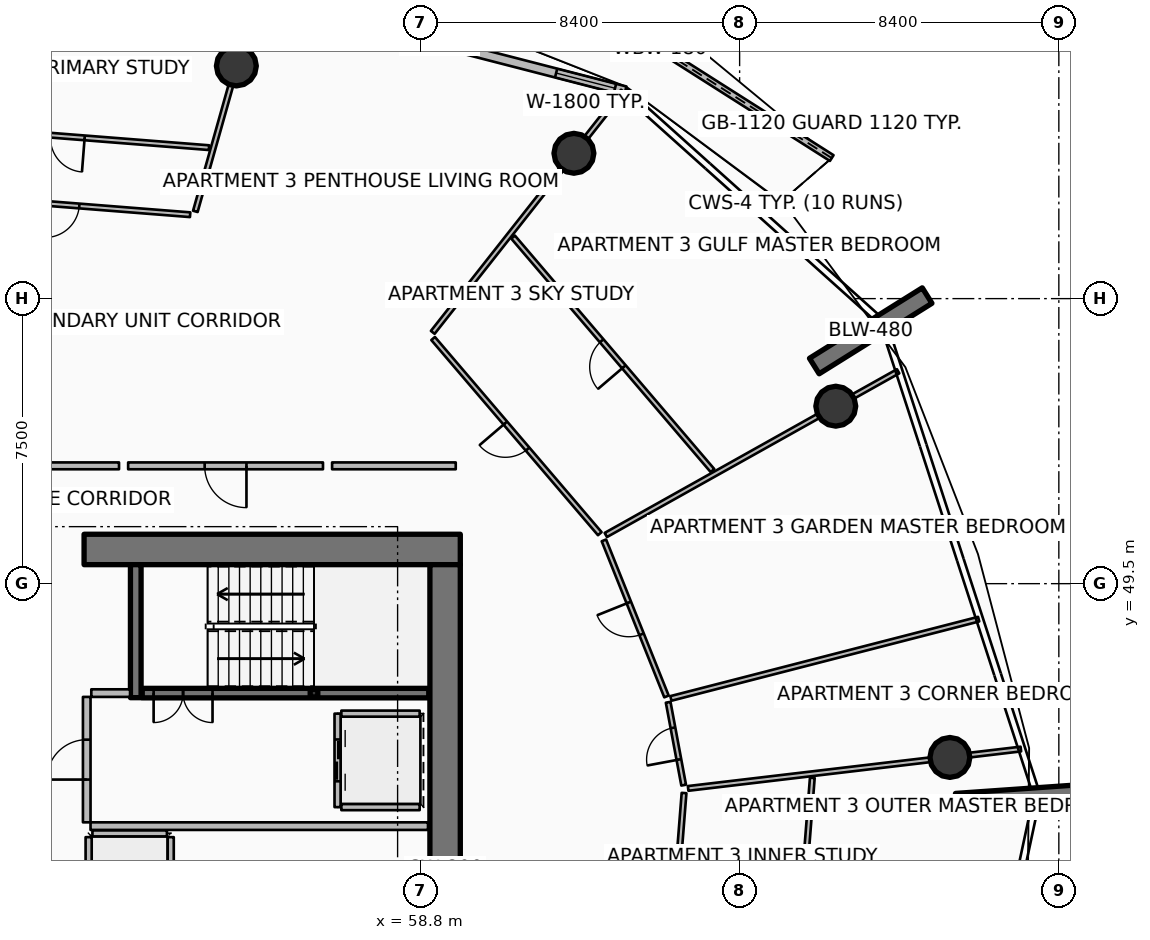
"""IFC4 building model, lengths in metres.
Left out: names, types, materials, properties, quantities, classifications, styles, units other than length and angle.
Written with IfcOpenShell. Run it as: python <this file> out.ifc"""

import sys

from ifc_helpers import new_model, si_unit, direction, frame, frame_2d, origin, origin_2d, place, context, subcontext, project, spatial, polyline, rectangle, hollow_rectangle, circle, outline, extrude, element, fill, save


model = new_model("IFC4")
c1 = context("Model", 3, precision=1e-05, world=origin(), true_north=direction((0.0, 1.0)))
c2 = subcontext(c1, "Body", "Model", "MODEL_VIEW")
j1 = project(units=[si_unit("LENGTHUNIT", "METRE"), si_unit("PLANEANGLEUNIT", "RADIAN")], contexts=[c1])
p1 = place(None, origin())
s1 = spatial("IfcSite", under=j1, at=p1, CompositionType="ELEMENT")
p2 = place(p1, origin())
s2 = spatial("IfcBuilding", under=s1, at=p2, CompositionType="ELEMENT")
p3 = place(p2, frame((0.0, 0.0, 157.8)))
s3 = spatial("IfcBuildingStorey", under=s2, at=p3, CompositionType="ELEMENT", Elevation=157.8)
p4 = place(p3, frame((49.95, 50.4, 0.0), z_axis=(0.0, 0.0, 1.0), x_axis=(1.0, 0.0, 0.0)))
e1 = element("IfcWall", 1, at=p4, inside=s3, PredefinedType="SHEAR", context=c2, shape_type="SweptSolid", body=[
    extrude(rectangle(XDim=9.9, YDim=0.8, at=frame_2d((4.95, 0.0))), origin(), (0.0, 0.0, 1.0), 3.75),
])
p5 = place(p3, frame((59.45, 34.0, 0.0), z_axis=(0.0, 0.0, 1.0), x_axis=(0.0, 1.0, 0.0)))
e2 = element("IfcWall", 2, at=p5, inside=s3, PredefinedType="SHEAR", context=c2, shape_type="SweptSolid", body=[
    extrude(rectangle(XDim=16.0, YDim=0.8, at=frame_2d((8.0, 0.0))), origin(), (0.0, 0.0, 1.0), 3.75),
])
p6 = place(p3, frame((51.31, 46.5, 0.0), z_axis=(0.0, 0.0, 1.0), x_axis=(0.0, 1.0, 0.0)))
e3 = element("IfcWall", 3, at=p6, inside=s3, PredefinedType="SHEAR", context=c2, shape_type="SweptSolid", body=[
    extrude(rectangle(XDim=3.5, YDim=0.28, at=frame_2d((1.75, 0.0))), origin(), (0.0, 0.0, 1.0), 3.75),
])
p7 = place(p3, frame((56.0, 46.62, 0.0), z_axis=(0.0, 0.0, 1.0), x_axis=(1.0, 0.0, 0.0)))
e4 = element("IfcColumn", 4, at=p7, inside=s3, PredefinedType="COLUMN", context=c2, shape_type="SweptSolid", body=[
    extrude(hollow_rectangle(XDim=0.2, YDim=0.2, WallThickness=0.01, InnerFilletRadius=0.01, OuterFilletRadius=0.02, at=origin_2d()), origin(), (0.0, 0.0, 1.0), 1.67),
])
for number, where, z_axis, x_axis in (
    (5, (69.165, 55.226, 0.0), (0.0, 0.0, 1.0), (0.848, 0.53, 0.0)),
    (6, (72.897, 43.741, 0.0), (0.0, 0.0, 1.0), (0.998, 0.07, 0.0)),
):
    element("IfcWall", number, at=place(p3, frame(where, z_axis=z_axis, x_axis=x_axis)), inside=s3, PredefinedType="SOLIDWALL", context=c2, shape_type="SweptSolid", body=[
        extrude(rectangle(XDim=3.5, YDim=0.48, at=frame_2d((1.75, 0.0))), origin(), (0.0, 0.0, 1.0), 3.75),
    ])
for number, where, z_axis, x_axis in (
    (7, (69.73, 54.169, 0.0), (0.0, 0.0, 1.0), (1.0, 0.0, 0.0)),
    (8, (62.84, 60.824, 0.0), (0.0, 0.0, 1.0), (1.0, 0.0, 0.0)),
    (9, (53.957, 63.122, 0.0), (0.0, 0.0, 1.0), (1.0, 0.0, 0.0)),
    (10, (72.733, 44.927, 0.0), (0.0, 0.0, 1.0), (1.0, 0.0, 0.0)),
):
    element("IfcColumn", number, at=place(p3, frame(where, z_axis=z_axis, x_axis=x_axis)), inside=s3, PredefinedType="COLUMN", context=c2, shape_type="SweptSolid", body=[
        extrude(circle(Radius=0.525, at=origin_2d()), origin(), (0.0, 0.0, 1.0), 3.5),
    ])
p8 = place(p3, frame((69.624, 60.698, 0.0), z_axis=(0.0, 0.0, 1.0), x_axis=(-0.844049978771, 0.536264518066, 0.0)))
e11 = element("IfcWall", 11, at=p8, inside=s3, PredefinedType="PARAPET", context=c2, shape_type="SweptSolid", body=[
    extrude(outline(polyline([(0.0, 0.0), (10.707, 0.0), (10.707, 1.632), (5.353, 1.418), (0.0, 1.233), (0.0, 0.0)])), frame((0.0, 0.09, 0.0), z_axis=(0.0, -1.0, 0.0), x_axis=(1.0, 0.0, 0.0)), (0.0, 0.0, 1.0), 0.18),
])
p9 = place(p3, frame((64.192, 62.466, 0.0), z_axis=(0.0, 0.0, 1.0), x_axis=(-0.968379685126, 0.249481032214, 0.0)))
e12 = element("IfcWall", 12, at=p9, inside=s3, PredefinedType="SOLIDWALL", context=c2, shape_type="SweptSolid", body=[
    extrude(rectangle(XDim=10.082, YDim=0.24, at=frame_2d((5.041, 0.0))), origin(), (0.0, 0.0, 1.0), 2.45),
])
p10 = place(p9, frame((7.862, 0.0, 0.0)))
e13 = element("IfcOpeningElement", 13, at=p10, cuts=e12, PredefinedType="OPENING", context=c2, shape_type="SweptSolid", body=[
    extrude(rectangle(XDim=1.45, YDim=2.15, at=frame_2d((0.725, 1.075))), frame((0.0, 0.13, 0.0), z_axis=(0.0, -1.0, 0.0), x_axis=(1.0, 0.0, 0.0)), (0.0, 0.0, 1.0), 0.26),
])
p11 = place(p9, frame((0.28, 0.0, 0.65)))
e14 = element("IfcOpeningElement", 14, at=p11, cuts=e12, PredefinedType="OPENING", context=c2, shape_type="SweptSolid", body=[
    extrude(rectangle(XDim=1.6, YDim=1.5, at=frame_2d((0.8, 0.75))), frame((0.0, 0.13, 0.0), z_axis=(0.0, -1.0, 0.0), x_axis=(1.0, 0.0, 0.0)), (0.0, 0.0, 1.0), 0.26),
])
p12 = place(p3, frame((51.48, 46.62, 0.0), z_axis=(0.0, 0.0, 1.0), x_axis=(1.0, 0.0, 0.0)))
e15 = element("IfcWall", 15, at=p12, inside=s3, PredefinedType="SOLIDWALL", context=c2, shape_type="SweptSolid", body=[
    extrude(rectangle(XDim=7.54, YDim=0.25, at=frame_2d((3.77, 0.0))), origin(), (0.0, 0.0, 1.0), 3.5),
])
p13 = place(p12, frame((0.3, 0.0, 0.0)))
e16 = element("IfcOpeningElement", 16, at=p13, cuts=e15, PredefinedType="OPENING", context=c2, shape_type="SweptSolid", body=[
    extrude(rectangle(XDim=1.55, YDim=2.15, at=frame_2d((0.775, 1.075))), frame((0.0, 0.135, 0.0), z_axis=(0.0, -1.0, 0.0), x_axis=(1.0, 0.0, 0.0)), (0.0, 0.0, 1.0), 0.27),
])
p14 = place(p3, frame((56.62, 46.08, 0.0), z_axis=(0.0, 0.0, 1.0), x_axis=(0.0, -1.0, 0.0)))
e17 = element("IfcWall", 17, at=p14, inside=s3, PredefinedType="PARTITIONING", context=c2, shape_type="SweptSolid", body=[
    extrude(rectangle(XDim=2.46, YDim=0.16, at=frame_2d((1.23, 0.0))), origin(), (0.0, 0.0, 1.0), 3.5),
])
p15 = place(p14, frame((0.68, 0.0, 0.0)))
e18 = element("IfcOpeningElement", 18, at=p15, cuts=e17, PredefinedType="OPENING", context=c2, shape_type="SweptSolid", body=[
    extrude(rectangle(XDim=1.1, YDim=2.1, at=frame_2d((0.55, 1.05))), frame((0.0, 0.09, 0.0), z_axis=(0.0, -1.0, 0.0), x_axis=(1.0, 0.0, 0.0)), (0.0, 0.0, 1.0), 0.18),
])
for number, where, z_axis, x_axis in (
    (19, (56.72, 46.08, 0.0), (0.0, 0.0, 1.0), (1.0, 0.0, 0.0)),
    (20, (56.72, 43.62, 0.0), (0.0, 0.0, 1.0), (1.0, 0.0, 0.0)),
):
    element("IfcWall", number, at=place(p3, frame(where, z_axis=z_axis, x_axis=x_axis)), inside=s3, PredefinedType="PARTITIONING", context=c2, shape_type="SweptSolid", body=[
        extrude(rectangle(XDim=2.06, YDim=0.16, at=frame_2d((1.03, 0.0))), origin(), (0.0, 0.0, 1.0), 3.5),
    ])
for number, where, z_axis, x_axis in (
    (21, (52.23, 40.67, 0.0), (0.0, 0.0, 1.0), (0.0, 1.0, 0.0)),
    (22, (50.07, 40.67, 0.0), (0.0, 0.0, 1.0), (0.0, 1.0, 0.0)),
):
    element("IfcWall", number, at=place(p3, frame(where, z_axis=z_axis, x_axis=x_axis)), inside=s3, PredefinedType="PARTITIONING", context=c2, shape_type="SweptSolid", body=[
        extrude(rectangle(XDim=2.16, YDim=0.16, at=frame_2d((1.08, 0.0))), origin(), (0.0, 0.0, 1.0), 3.5),
    ])
p16 = place(p3, frame((50.17, 42.93, 0.0), z_axis=(0.0, 0.0, 1.0), x_axis=(1.0, 0.0, 0.0)))
e23 = element("IfcWall", 23, at=p16, inside=s3, PredefinedType="PARTITIONING", context=c2, shape_type="SweptSolid", body=[
    extrude(rectangle(XDim=1.96, YDim=0.16, at=frame_2d((0.98, 0.0))), origin(), (0.0, 0.0, 1.0), 3.5),
])
p17 = place(p3, frame((50.12, 43.12, 0.0), z_axis=(0.0, 0.0, 1.0), x_axis=(1.0, 0.0, 0.0)))
e24 = element("IfcWall", 24, at=p17, inside=s3, PredefinedType="PARTITIONING", context=c2, shape_type="SweptSolid", body=[
    extrude(rectangle(XDim=8.88, YDim=0.2, at=frame_2d((4.44, 0.0))), origin(), (0.0, 0.0, 1.0), 3.5),
])
p18 = place(p3, frame((50.14, 46.62, 0.0), z_axis=(0.0, 0.0, 1.0), x_axis=(1.0, 0.0, 0.0)))
e25 = element("IfcWall", 25, at=p18, inside=s3, PredefinedType="PARTITIONING", context=c2, shape_type="SweptSolid", body=[
    extrude(rectangle(XDim=1.02, YDim=0.2, at=frame_2d((0.51, 0.0))), origin(), (0.0, 0.0, 1.0), 3.5),
])
p19 = place(p3, frame((50.02, 43.22, 0.0), z_axis=(0.0, 0.0, 1.0), x_axis=(0.0, 1.0, 0.0)))
e26 = element("IfcWall", 26, at=p19, inside=s3, PredefinedType="PARTITIONING", context=c2, shape_type="SweptSolid", body=[
    extrude(rectangle(XDim=3.3, YDim=0.2, at=frame_2d((1.65, 0.0))), origin(), (0.0, 0.0, 1.0), 3.5),
])
p20 = place(p19, frame((1.125, 0.0, 0.0)))
e27 = element("IfcOpeningElement", 27, at=p20, cuts=e26, PredefinedType="OPENING", context=c2, shape_type="SweptSolid", body=[
    extrude(rectangle(XDim=1.05, YDim=2.1, at=frame_2d((0.525, 1.05))), frame((0.0, 0.11, 0.0), z_axis=(0.0, -1.0, 0.0), x_axis=(1.0, 0.0, 0.0)), (0.0, 0.0, 1.0), 0.22),
])
p21 = place(p3, frame((56.236, 52.6, 0.0), z_axis=(0.0, 0.0, 1.0), x_axis=(-1.0, 0.0, 0.0)))
e28 = element("IfcWall", 28, at=p21, inside=s3, PredefinedType="PARTITIONING", context=c2, shape_type="SweptSolid", body=[
    extrude(rectangle(XDim=5.127, YDim=0.18, at=frame_2d((2.563, 0.0))), origin(), (0.0, 0.0, 1.0), 2.94),
])
p22 = place(p21, frame((2.013, 0.0, 0.0)))
e29 = element("IfcOpeningElement", 29, at=p22, cuts=e28, PredefinedType="OPENING", context=c2, shape_type="SweptSolid", body=[
    extrude(rectangle(XDim=1.1, YDim=2.1, at=frame_2d((0.55, 1.05))), frame((0.0, 0.1, 0.0), z_axis=(0.0, -1.0, 0.0), x_axis=(1.0, 0.0, 0.0)), (0.0, 0.0, 1.0), 0.2),
])
p23 = place(p3, frame((65.208, 37.259, 0.0), z_axis=(0.0, 0.0, 1.0), x_axis=(0.078457580711, 0.996917452966, 0.0)))
e30 = element("IfcWall", 30, at=p23, inside=s3, PredefinedType="PARTITIONING", context=c2, shape_type="SweptSolid", body=[
    extrude(rectangle(XDim=6.752, YDim=0.125, at=frame_2d((3.376, 0.0))), origin(), (0.0, 0.0, 1.0), 2.94),
])
p24 = place(p23, frame((2.926, 0.0, 0.0)))
e31 = element("IfcOpeningElement", 31, at=p24, cuts=e30, PredefinedType="OPENING", context=c2, shape_type="SweptSolid", body=[
    extrude(rectangle(XDim=0.9, YDim=2.08, at=frame_2d((0.45, 1.04))), frame((0.0, 0.073, 0.0), z_axis=(0.0, -1.0, 0.0), x_axis=(1.0, 0.0, 0.0)), (0.0, 0.0, 1.0), 0.145),
])
p25 = place(p3, frame((68.479, 36.336, 0.0), z_axis=(0.0, 0.0, 1.0), x_axis=(0.078482765766, 0.996915470578, 0.0)))
e32 = element("IfcWall", 32, at=p25, inside=s3, PredefinedType="PARTITIONING", context=c2, shape_type="SweptSolid", body=[
    extrude(rectangle(XDim=8.079, YDim=0.125, at=frame_2d((4.039, 0.0))), origin(), (0.0, 0.0, 1.0), 2.94),
])
p26 = place(p25, frame((3.589, 0.0, 0.0)))
e33 = element("IfcOpeningElement", 33, at=p26, cuts=e32, PredefinedType="OPENING", context=c2, shape_type="SweptSolid", body=[
    extrude(rectangle(XDim=0.9, YDim=2.08, at=frame_2d((0.45, 1.04))), frame((0.0, 0.073, 0.0), z_axis=(0.0, -1.0, 0.0), x_axis=(1.0, 0.0, 0.0)), (0.0, 0.0, 1.0), 0.145),
])
p27 = place(p3, frame((65.845, 44.112, 0.0), z_axis=(0.0, 0.0, 1.0), x_axis=(0.993069843717, 0.117525680174, 0.0)))
e34 = element("IfcWall", 34, at=p27, inside=s3, PredefinedType="PARTITIONING", context=c2, shape_type="SweptSolid", body=[
    extrude(rectangle(XDim=8.816, YDim=0.125, at=frame_2d((4.408, 0.0))), origin(), (0.0, 0.0, 1.0), 2.94),
])
p28 = place(p3, frame((65.392, 46.48, 0.0), z_axis=(0.0, 0.0, 1.0), x_axis=(0.968391846752, 0.249433821172, 0.0)))
e35 = element("IfcWall", 35, at=p28, inside=s3, PredefinedType="PARTITIONING", context=c2, shape_type="SweptSolid", body=[
    extrude(rectangle(XDim=8.362, YDim=0.125, at=frame_2d((4.181, 0.0))), origin(), (0.0, 0.0, 1.0), 2.94),
])
p29 = place(p3, frame((65.728, 44.199, 0.0), z_axis=(0.0, 0.0, 1.0), x_axis=(-0.183909749888, 0.982943133602, 0.0)))
e36 = element("IfcWall", 36, at=p29, inside=s3, PredefinedType="PARTITIONING", context=c2, shape_type="SweptSolid", body=[
    extrude(rectangle(XDim=2.218, YDim=0.125, at=frame_2d((1.109, 0.0))), origin(), (0.0, 0.0, 1.0), 2.94),
])
p30 = place(p29, frame((0.684, 0.0, 0.0)))
e37 = element("IfcOpeningElement", 37, at=p30, cuts=e36, PredefinedType="OPENING", context=c2, shape_type="SweptSolid", body=[
    extrude(rectangle(XDim=0.85, YDim=2.06, at=frame_2d((0.425, 1.03))), frame((0.0, 0.073, 0.0), z_axis=(0.0, -1.0, 0.0), x_axis=(1.0, 0.0, 0.0)), (0.0, 0.0, 1.0), 0.145),
])
p31 = place(p3, frame((65.275, 46.532, 0.0), z_axis=(0.0, 0.0, 1.0), x_axis=(-0.372161107737, 0.928168147421, 0.0)))
e38 = element("IfcWall", 38, at=p31, inside=s3, PredefinedType="PARTITIONING", context=c2, shape_type="SweptSolid", body=[
    extrude(rectangle(XDim=4.425, YDim=0.125, at=frame_2d((2.212, 0.0))), origin(), (0.0, 0.0, 1.0), 2.94),
])
p32 = place(p31, frame((1.762, 0.0, 0.0)))
e39 = element("IfcOpeningElement", 39, at=p32, cuts=e38, PredefinedType="OPENING", context=c2, shape_type="SweptSolid", body=[
    extrude(rectangle(XDim=0.9, YDim=2.08, at=frame_2d((0.45, 1.04))), frame((0.0, 0.073, 0.0), z_axis=(0.0, -1.0, 0.0), x_axis=(1.0, 0.0, 0.0)), (0.0, 0.0, 1.0), 0.145),
])
p33 = place(p3, frame((59.73, 52.6, 0.0), z_axis=(0.0, 0.0, 1.0), x_axis=(-1.0, 0.0, 0.0)))
e40 = element("IfcWall", 40, at=p33, inside=s3, PredefinedType="PARTITIONING", context=c2, shape_type="SweptSolid", body=[
    extrude(rectangle(XDim=3.254, YDim=0.18, at=frame_2d((1.627, 0.0))), origin(), (0.0, 0.0, 1.0), 2.94),
])
p34 = place(p3, frame((63.679, 50.781, 0.0), z_axis=(0.0, 0.0, 1.0), x_axis=(0.872493265844, 0.488626136281, 0.0)))
e41 = element("IfcWall", 41, at=p34, inside=s3, PredefinedType="PARTITIONING", context=c2, shape_type="SweptSolid", body=[
    extrude(rectangle(XDim=8.816, YDim=0.125, at=frame_2d((4.408, 0.0))), origin(), (0.0, 0.0, 1.0), 2.94),
])
p35 = place(p3, frame((59.125, 56.112, 0.0), z_axis=(0.0, 0.0, 1.0), x_axis=(0.61910151414, 0.78531096719, 0.0)))
e42 = element("IfcWall", 42, at=p35, inside=s3, PredefinedType="PARTITIONING", context=c2, shape_type="SweptSolid", body=[
    extrude(rectangle(XDim=8.082, YDim=0.125, at=frame_2d((4.041, 0.0))), origin(), (0.0, 0.0, 1.0), 2.94),
])
p36 = place(p3, frame((63.52, 50.815, 0.0), z_axis=(0.0, 0.0, 1.0), x_axis=(-0.649447526186, 0.760406411553, 0.0)))
e43 = element("IfcWall", 43, at=p36, inside=s3, PredefinedType="PARTITIONING", context=c2, shape_type="SweptSolid", body=[
    extrude(rectangle(XDim=6.753, YDim=0.125, at=frame_2d((3.376, 0.0))), origin(), (0.0, 0.0, 1.0), 2.94),
])
p37 = place(p36, frame((2.926, 0.0, 0.0)))
e44 = element("IfcOpeningElement", 44, at=p37, cuts=e43, PredefinedType="OPENING", context=c2, shape_type="SweptSolid", body=[
    extrude(rectangle(XDim=0.9, YDim=2.08, at=frame_2d((0.45, 1.04))), frame((0.0, 0.073, 0.0), z_axis=(0.0, -1.0, 0.0), x_axis=(1.0, 0.0, 0.0)), (0.0, 0.0, 1.0), 0.145),
])
p38 = place(p3, frame((66.486, 52.476, 0.0), z_axis=(0.0, 0.0, 1.0), x_axis=(-0.649426515446, 0.760424355894, 0.0)))
e45 = element("IfcWall", 45, at=p38, inside=s3, PredefinedType="PARTITIONING", context=c2, shape_type="SweptSolid", body=[
    extrude(rectangle(XDim=8.079, YDim=0.125, at=frame_2d((4.04, 0.0))), origin(), (0.0, 0.0, 1.0), 2.94),
])
p39 = place(p38, frame((3.589, 0.0, 0.0)))
e46 = element("IfcOpeningElement", 46, at=p39, cuts=e45, PredefinedType="OPENING", context=c2, shape_type="SweptSolid", body=[
    extrude(rectangle(XDim=0.9, YDim=2.08, at=frame_2d((0.45, 1.04))), frame((0.0, 0.073, 0.0), z_axis=(0.0, -1.0, 0.0), x_axis=(1.0, 0.0, 0.0)), (0.0, 0.0, 1.0), 0.145),
])
p40 = place(p3, frame((50.869, 52.6, 0.0), z_axis=(0.0, 0.0, 1.0), x_axis=(-1.0, 0.0, 0.0)))
e47 = element("IfcWall", 47, at=p40, inside=s3, PredefinedType="PARTITIONING", context=c2, shape_type="SweptSolid", body=[
    extrude(rectangle(XDim=4.004, YDim=0.18, at=frame_2d((2.002, 0.0))), origin(), (0.0, 0.0, 1.0), 2.94),
])
p41 = place(p3, frame((52.878, 59.295, 0.0), z_axis=(0.0, 0.0, 1.0), x_axis=(0.271461170106, 0.962449392501, 0.0)))
e48 = element("IfcWall", 48, at=p41, inside=s3, PredefinedType="PARTITIONING", context=c2, shape_type="SweptSolid", body=[
    extrude(rectangle(XDim=5.769, YDim=0.125, at=frame_2d((2.885, 0.0))), origin(), (0.0, 0.0, 1.0), 2.94),
])
p42 = place(p3, frame((52.741, 59.208, 0.0), z_axis=(0.0, 0.0, 1.0), x_axis=(-0.996917452966, 0.078457580711, 0.0)))
e49 = element("IfcWall", 49, at=p42, inside=s3, PredefinedType="PARTITIONING", context=c2, shape_type="SweptSolid", body=[
    extrude(rectangle(XDim=6.752, YDim=0.125, at=frame_2d((3.376, 0.0))), origin(), (0.0, 0.0, 1.0), 2.94),
])
p43 = place(p42, frame((2.926, 0.0, 0.0)))
e50 = element("IfcOpeningElement", 50, at=p43, cuts=e49, PredefinedType="OPENING", context=c2, shape_type="SweptSolid", body=[
    extrude(rectangle(XDim=0.9, YDim=2.08, at=frame_2d((0.45, 1.04))), frame((0.0, 0.073, 0.0), z_axis=(0.0, -1.0, 0.0), x_axis=(1.0, 0.0, 0.0)), (0.0, 0.0, 1.0), 0.145),
])
p44 = place(p3, frame((53.239, 60.972, 0.0), z_axis=(0.0, 0.0, 1.0), x_axis=(-0.996916953075, 0.078463932292, 0.0)))
e51 = element("IfcWall", 51, at=p44, inside=s3, PredefinedType="PARTITIONING", context=c2, shape_type="SweptSolid", body=[
    extrude(rectangle(XDim=7.468, YDim=0.125, at=frame_2d((3.734, 0.0))), origin(), (0.0, 0.0, 1.0), 2.94),
])
p45 = place(p44, frame((3.284, 0.0, 0.0)))
e52 = element("IfcOpeningElement", 52, at=p45, cuts=e51, PredefinedType="OPENING", context=c2, shape_type="SweptSolid", body=[
    extrude(rectangle(XDim=0.9, YDim=2.08, at=frame_2d((0.45, 1.04))), frame((0.0, 0.073, 0.0), z_axis=(0.0, -1.0, 0.0), x_axis=(1.0, 0.0, 0.0)), (0.0, 0.0, 1.0), 0.145),
])
p46 = place(p11, origin())
e53 = element("IfcWindow", 53, at=p46, inside=s3, PartitioningType="SINGLE_PANEL", PredefinedType="WINDOW", context=c2, shape_type="SweptSolid", body=[
    extrude(rectangle(XDim=1.6, YDim=1.5, at=frame_2d((0.8, 0.75))), frame((0.0, 0.03, 0.0), z_axis=(0.0, -1.0, 0.0), x_axis=(1.0, 0.0, 0.0)), (0.0, 0.0, 1.0), 0.06),
])
fill(e14, e53)
p47 = place(p13, origin())
e54 = element("IfcDoor", 54, at=p47, inside=s3, OperationType="DOUBLE_DOOR_SINGLE_SWING", PredefinedType="DOOR", context=c2, shape_type="SweptSolid", body=[
    extrude(rectangle(XDim=1.55, YDim=2.15, at=frame_2d((0.775, 1.075))), frame((0.0, 0.025, 0.0), z_axis=(0.0, -1.0, 0.0), x_axis=(1.0, 0.0, 0.0)), (0.0, 0.0, 1.0), 0.05),
])
fill(e16, e54)
p48 = place(p15, origin())
e55 = element("IfcDoor", 55, at=p48, inside=s3, OperationType="DOUBLE_DOOR_SLIDING", PredefinedType="DOOR", context=c2, shape_type="SweptSolid", body=[
    extrude(rectangle(XDim=1.1, YDim=2.1, at=frame_2d((0.55, 1.05))), frame((0.0, 0.025, 0.0), z_axis=(0.0, -1.0, 0.0), x_axis=(1.0, 0.0, 0.0)), (0.0, 0.0, 1.0), 0.05),
])
fill(e18, e55)
p49 = place(p20, origin())
e56 = element("IfcDoor", 56, at=p49, inside=s3, OperationType="SINGLE_SWING_LEFT", PredefinedType="DOOR", context=c2, shape_type="SweptSolid", body=[
    extrude(rectangle(XDim=1.05, YDim=2.1, at=frame_2d((0.525, 1.05))), frame((0.0, 0.025, 0.0), z_axis=(0.0, -1.0, 0.0), x_axis=(1.0, 0.0, 0.0)), (0.0, 0.0, 1.0), 0.05),
])
fill(e27, e56)
p50 = place(p22, origin())
e57 = element("IfcDoor", 57, at=p50, inside=s3, OperationType="SINGLE_SWING_LEFT", PredefinedType="DOOR", context=c2, shape_type="SweptSolid", body=[
    extrude(rectangle(XDim=1.1, YDim=2.1, at=frame_2d((0.55, 1.05))), frame((0.0, 0.025, 0.0), z_axis=(0.0, -1.0, 0.0), x_axis=(1.0, 0.0, 0.0)), (0.0, 0.0, 1.0), 0.05),
])
fill(e29, e57)
p51 = place(p30, origin())
e58 = element("IfcDoor", 58, at=p51, inside=s3, OperationType="SINGLE_SWING_LEFT", PredefinedType="DOOR", context=c2, shape_type="SweptSolid", body=[
    extrude(rectangle(XDim=0.85, YDim=2.06, at=frame_2d((0.425, 1.03))), frame((0.0, 0.025, 0.0), z_axis=(0.0, -1.0, 0.0), x_axis=(1.0, 0.0, 0.0)), (0.0, 0.0, 1.0), 0.05),
])
fill(e37, e58)
p52 = place(p32, origin())
e59 = element("IfcDoor", 59, at=p52, inside=s3, OperationType="SINGLE_SWING_RIGHT", PredefinedType="DOOR", context=c2, shape_type="SweptSolid", body=[
    extrude(rectangle(XDim=0.9, YDim=2.08, at=frame_2d((0.45, 1.04))), frame((0.0, 0.025, 0.0), z_axis=(0.0, -1.0, 0.0), x_axis=(1.0, 0.0, 0.0)), (0.0, 0.0, 1.0), 0.05),
])
fill(e39, e59)
p53 = place(p37, origin())
e60 = element("IfcDoor", 60, at=p53, inside=s3, OperationType="SINGLE_SWING_RIGHT", PredefinedType="DOOR", context=c2, shape_type="SweptSolid", body=[
    extrude(rectangle(XDim=0.9, YDim=2.08, at=frame_2d((0.45, 1.04))), frame((0.0, 0.025, 0.0), z_axis=(0.0, -1.0, 0.0), x_axis=(1.0, 0.0, 0.0)), (0.0, 0.0, 1.0), 0.05),
])
fill(e44, e60)
p54 = place(p39, origin())
e61 = element("IfcDoor", 61, at=p54, inside=s3, OperationType="SINGLE_SWING_LEFT", PredefinedType="DOOR", context=c2, shape_type="SweptSolid", body=[
    extrude(rectangle(XDim=0.9, YDim=2.08, at=frame_2d((0.45, 1.04))), frame((0.0, 0.025, 0.0), z_axis=(0.0, -1.0, 0.0), x_axis=(1.0, 0.0, 0.0)), (0.0, 0.0, 1.0), 0.05),
])
fill(e46, e61)
p55 = place(p43, origin())
e62 = element("IfcDoor", 62, at=p55, inside=s3, OperationType="SINGLE_SWING_RIGHT", PredefinedType="DOOR", context=c2, shape_type="SweptSolid", body=[
    extrude(rectangle(XDim=0.9, YDim=2.08, at=frame_2d((0.45, 1.04))), frame((0.0, 0.025, 0.0), z_axis=(0.0, -1.0, 0.0), x_axis=(1.0, 0.0, 0.0)), (0.0, 0.0, 1.0), 0.05),
])
fill(e50, e62)
p56 = place(p45, origin())
e63 = element("IfcDoor", 63, at=p56, inside=s3, OperationType="SINGLE_SWING_LEFT", PredefinedType="DOOR", context=c2, shape_type="SweptSolid", body=[
    extrude(rectangle(XDim=0.9, YDim=2.08, at=frame_2d((0.45, 1.04))), frame((0.0, 0.025, 0.0), z_axis=(0.0, -1.0, 0.0), x_axis=(1.0, 0.0, 0.0)), (0.0, 0.0, 1.0), 0.05),
])
fill(e52, e63)
save(model, sys.argv[1])
